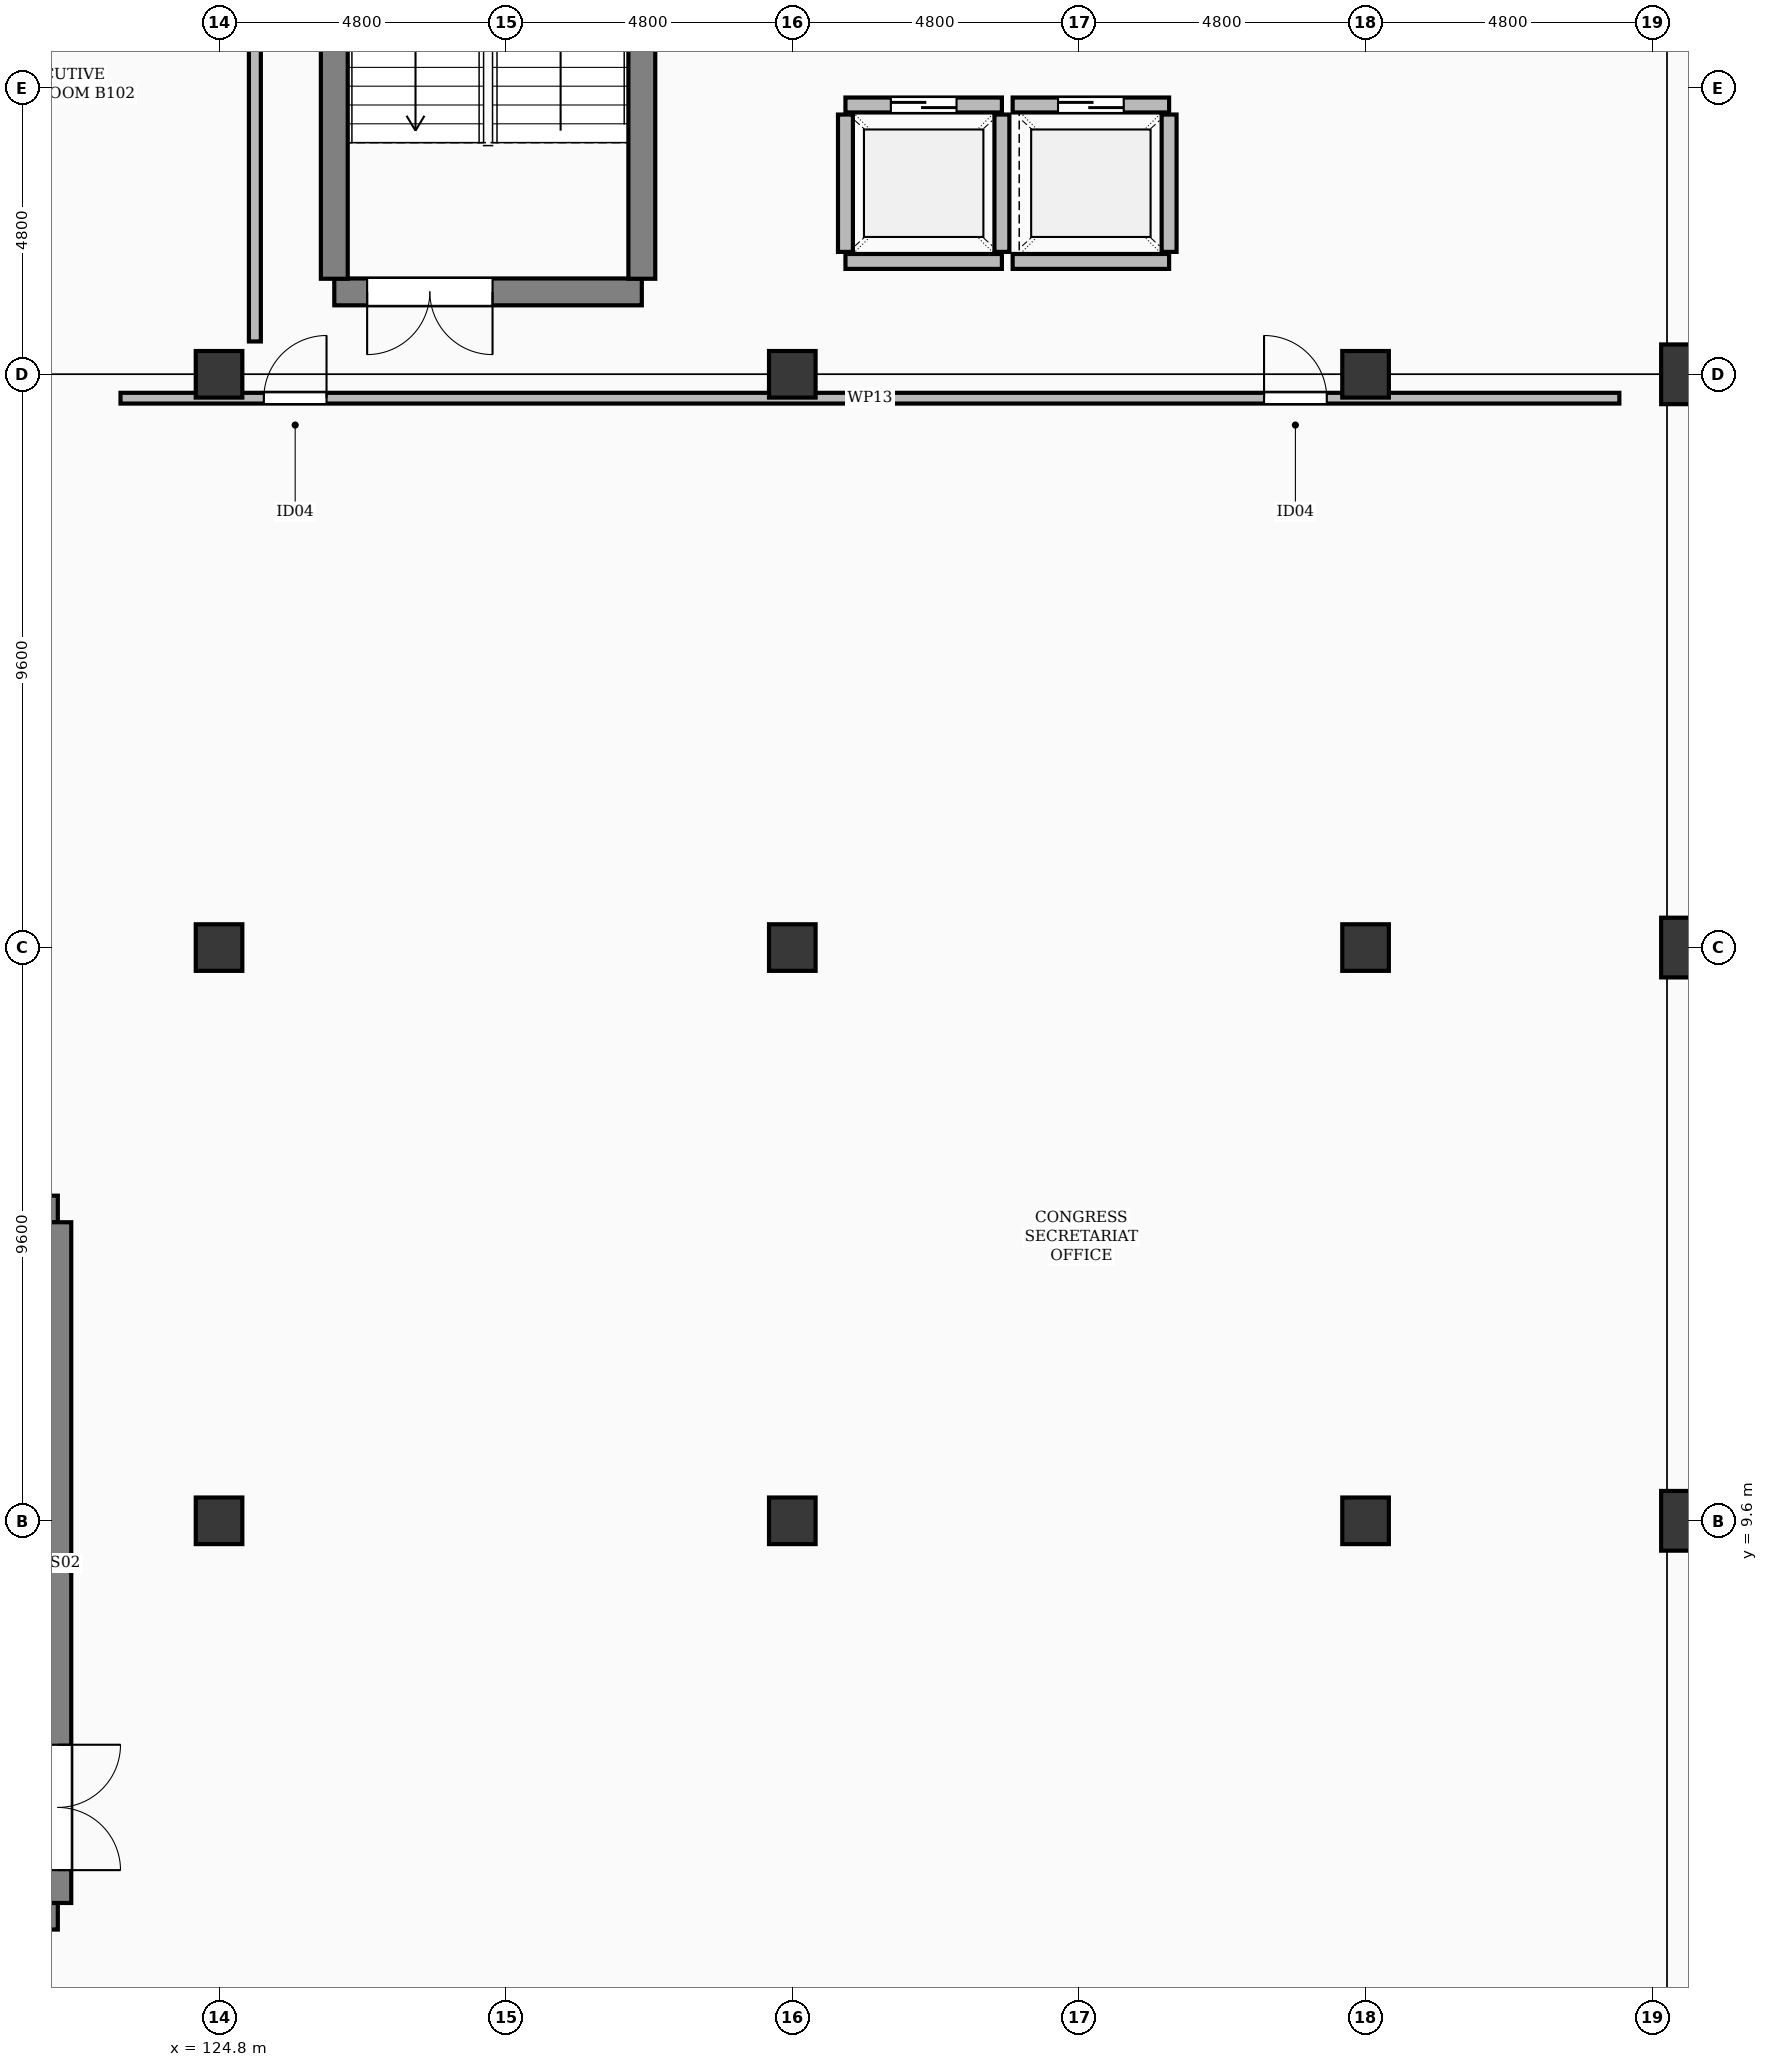
"""IFC4 building model, lengths in metres.
Left out: names, types, materials, properties, quantities, classifications, styles, units other than length and angle.
Written with IfcOpenShell. Run it as: python <this file> out.ifc"""

import sys

from ifc_helpers import new_model, si_unit, direction, frame, frame_2d, origin, origin_2d, place, context, subcontext, project, spatial, rectangle, extrude, element, fill, save


model = new_model("IFC4")
c1 = context("Model", 3, precision=1e-05, world=origin(), true_north=direction((0.0, 1.0)))
c2 = subcontext(c1, "Body", "Model", "MODEL_VIEW")
j1 = project(units=[si_unit("LENGTHUNIT", "METRE"), si_unit("PLANEANGLEUNIT", "RADIAN")], contexts=[c1])
p1 = place(None, origin())
s1 = spatial("IfcSite", under=j1, at=p1, CompositionType="ELEMENT")
p2 = place(p1, origin())
s2 = spatial("IfcBuilding", under=s1, at=p2, CompositionType="ELEMENT")
p3 = place(p2, frame((0.0, 0.0, 6.0)))
s3 = spatial("IfcBuildingStorey", under=s2, at=p3, CompositionType="ELEMENT", Elevation=6.0)
for number, where, z_axis, x_axis in (
    (1, (124.8, 9.6, 0.0), (0.0, 0.0, 1.0), (1.0, 0.0, 0.0)),
    (2, (124.8, 19.2, 0.0), (0.0, 0.0, 1.0), (1.0, 0.0, 0.0)),
    (3, (124.8, 28.8, 0.0), (0.0, 0.0, 1.0), (1.0, 0.0, 0.0)),
    (4, (134.4, 9.6, 0.0), (0.0, 0.0, 1.0), (1.0, 0.0, 0.0)),
    (5, (134.4, 19.2, 0.0), (0.0, 0.0, 1.0), (1.0, 0.0, 0.0)),
    (6, (134.4, 28.8, 0.0), (0.0, 0.0, 1.0), (1.0, 0.0, 0.0)),
    (7, (144.0, 9.6, 0.0), (0.0, 0.0, 1.0), (1.0, 0.0, 0.0)),
    (8, (144.0, 19.2, 0.0), (0.0, 0.0, 1.0), (1.0, 0.0, 0.0)),
    (9, (144.0, 28.8, 0.0), (0.0, 0.0, 1.0), (1.0, 0.0, 0.0)),
):
    element("IfcColumn", number, at=place(p3, frame(where, z_axis=z_axis, x_axis=x_axis)), inside=s3, PredefinedType="COLUMN", context=c2, shape_type="SweptSolid", body=[
        extrude(rectangle(XDim=0.78, YDim=0.78, at=origin_2d()), origin(), (0.0, 0.0, 1.0), 5.4),
    ])
for number, where, z_axis, x_axis in (
    (10, (149.45, 9.6, 0.0), (0.0, 0.0, 1.0), (1.0, 0.0, 0.0)),
    (11, (149.45, 19.2, 0.0), (0.0, 0.0, 1.0), (1.0, 0.0, 0.0)),
    (12, (149.45, 28.8, 0.0), (0.0, 0.0, 1.0), (1.0, 0.0, 0.0)),
):
    element("IfcColumn", number, at=place(p3, frame(where, z_axis=z_axis, x_axis=x_axis)), inside=s3, PredefinedType="COLUMN", context=c2, shape_type="SweptSolid", body=[
        extrude(rectangle(XDim=1.0, YDim=1.0, at=origin_2d()), origin(), (0.0, 0.0, 1.0), 5.4),
    ])
p4 = place(p3, frame((126.73, 30.18, 0.0), z_axis=(0.0, 0.0, 1.0), x_axis=(1.0, 0.0, 0.0)))
e13 = element("IfcWall", 13, at=p4, inside=s3, PredefinedType="SHEAR", context=c2, shape_type="SweptSolid", body=[
    extrude(rectangle(XDim=5.15, YDim=0.45, at=frame_2d((2.575, 0.0))), origin(), (0.0, 0.0, 1.0), 5.1),
])
p5 = place(p4, frame((0.55, 0.0, 0.0)))
e14 = element("IfcOpeningElement", 14, at=p5, cuts=e13, PredefinedType="OPENING", context=c2, shape_type="SweptSolid", body=[
    extrude(rectangle(XDim=2.1, YDim=2.2, at=frame_2d((1.05, 1.1))), frame((0.0, 0.237, 0.0), z_axis=(0.0, -1.0, 0.0), x_axis=(1.0, 0.0, 0.0)), (0.0, 0.0, 1.0), 0.474),
])
for number, where, z_axis, x_axis in (
    (15, (126.73, 30.4, 0.0), (0.0, 0.0, 1.0), (0.0, 1.0, 0.0)),
    (16, (131.88, 30.4, 0.0), (0.0, 0.0, 1.0), (0.0, 1.0, 0.0)),
):
    element("IfcWall", number, at=place(p3, frame(where, z_axis=z_axis, x_axis=x_axis)), inside=s3, PredefinedType="SHEAR", context=c2, shape_type="SweptSolid", body=[
        extrude(rectangle(XDim=11.6, YDim=0.45, at=frame_2d((5.8, 0.0))), origin(), (0.0, 0.0, 1.0), 5.1),
    ])
p6 = place(p3, frame((135.29, 30.69, 0.0), z_axis=(0.0, 0.0, 1.0), x_axis=(1.0, 0.0, 0.0)))
e17 = element("IfcWall", 17, at=p6, inside=s3, PredefinedType="SOLIDWALL", context=c2, shape_type="SweptSolid", body=[
    extrude(rectangle(XDim=2.62, YDim=0.25, at=frame_2d((1.31, 0.0))), origin(), (0.0, 0.0, 1.0), 5.1),
])
p7 = place(p3, frame((135.29, 33.31, 0.0), z_axis=(0.0, 0.0, 1.0), x_axis=(1.0, 0.0, 0.0)))
e18 = element("IfcWall", 18, at=p7, inside=s3, PredefinedType="SOLIDWALL", context=c2, shape_type="SweptSolid", body=[
    extrude(rectangle(XDim=2.62, YDim=0.25, at=frame_2d((1.31, 0.0))), origin(), (0.0, 0.0, 1.0), 5.1),
])
p8 = place(p7, frame((0.76, 0.0, 0.0)))
e19 = element("IfcOpeningElement", 19, at=p8, cuts=e18, PredefinedType="OPENING", context=c2, shape_type="SweptSolid", body=[
    extrude(rectangle(XDim=1.1, YDim=2.2, at=frame_2d((0.55, 1.1))), frame((0.0, 0.137, 0.0), z_axis=(0.0, -1.0, 0.0), x_axis=(1.0, 0.0, 0.0)), (0.0, 0.0, 1.0), 0.274),
])
for number, where, z_axis, x_axis in (
    (20, (135.29, 30.85, 0.0), (0.0, 0.0, 1.0), (0.0, 1.0, 0.0)),
    (21, (137.91, 30.85, 0.0), (0.0, 0.0, 1.0), (0.0, 1.0, 0.0)),
):
    element("IfcWall", number, at=place(p3, frame(where, z_axis=z_axis, x_axis=x_axis)), inside=s3, PredefinedType="SOLIDWALL", context=c2, shape_type="SweptSolid", body=[
        extrude(rectangle(XDim=2.3, YDim=0.25, at=frame_2d((1.15, 0.0))), origin(), (0.0, 0.0, 1.0), 5.1),
    ])
p9 = place(p3, frame((138.09, 30.69, 0.0), z_axis=(0.0, 0.0, 1.0), x_axis=(1.0, 0.0, 0.0)))
e22 = element("IfcWall", 22, at=p9, inside=s3, PredefinedType="SOLIDWALL", context=c2, shape_type="SweptSolid", body=[
    extrude(rectangle(XDim=2.62, YDim=0.25, at=frame_2d((1.31, 0.0))), origin(), (0.0, 0.0, 1.0), 5.1),
])
p10 = place(p3, frame((138.09, 33.31, 0.0), z_axis=(0.0, 0.0, 1.0), x_axis=(1.0, 0.0, 0.0)))
e23 = element("IfcWall", 23, at=p10, inside=s3, PredefinedType="SOLIDWALL", context=c2, shape_type="SweptSolid", body=[
    extrude(rectangle(XDim=2.62, YDim=0.25, at=frame_2d((1.31, 0.0))), origin(), (0.0, 0.0, 1.0), 5.1),
])
p11 = place(p10, frame((0.76, 0.0, 0.0)))
e24 = element("IfcOpeningElement", 24, at=p11, cuts=e23, PredefinedType="OPENING", context=c2, shape_type="SweptSolid", body=[
    extrude(rectangle(XDim=1.1, YDim=2.2, at=frame_2d((0.55, 1.1))), frame((0.0, 0.137, 0.0), z_axis=(0.0, -1.0, 0.0), x_axis=(1.0, 0.0, 0.0)), (0.0, 0.0, 1.0), 0.274),
])
p12 = place(p3, frame((140.71, 30.85, 0.0), z_axis=(0.0, 0.0, 1.0), x_axis=(0.0, 1.0, 0.0)))
e25 = element("IfcWall", 25, at=p12, inside=s3, PredefinedType="SOLIDWALL", context=c2, shape_type="SweptSolid", body=[
    extrude(rectangle(XDim=2.3, YDim=0.25, at=frame_2d((1.15, 0.0))), origin(), (0.0, 0.0, 1.0), 5.1),
])
for number, where, z_axis, x_axis in (
    (26, (116.95, 2.98, 0.0), (0.0, 0.0, 1.0), (1.0, 0.0, 0.0)),
    (27, (116.95, 14.82, 0.0), (0.0, 0.0, 1.0), (1.0, 0.0, 0.0)),
):
    element("IfcWall", number, at=place(p3, frame(where, z_axis=z_axis, x_axis=x_axis)), inside=s3, PredefinedType="SHEAR", context=c2, shape_type="SweptSolid", body=[
        extrude(rectangle(XDim=5.15, YDim=0.45, at=frame_2d((2.575, 0.0))), origin(), (0.0, 0.0, 1.0), 5.1),
    ])
p13 = place(p3, frame((122.1, 3.2, 0.0), z_axis=(0.0, 0.0, 1.0), x_axis=(0.0, 1.0, 0.0)))
e28 = element("IfcWall", 28, at=p13, inside=s3, PredefinedType="SHEAR", context=c2, shape_type="SweptSolid", body=[
    extrude(rectangle(XDim=11.4, YDim=0.45, at=frame_2d((5.7, 0.0))), origin(), (0.0, 0.0, 1.0), 5.1),
])
p14 = place(p13, frame((0.55, 0.0, 0.0)))
e29 = element("IfcOpeningElement", 29, at=p14, cuts=e28, PredefinedType="OPENING", context=c2, shape_type="SweptSolid", body=[
    extrude(rectangle(XDim=2.1, YDim=2.2, at=frame_2d((1.05, 1.1))), frame((0.0, 0.237, 0.0), z_axis=(0.0, -1.0, 0.0), x_axis=(1.0, 0.0, 0.0)), (0.0, 0.0, 1.0), 0.474),
])
p15 = place(p3, frame((125.4, 29.35, 0.0), z_axis=(0.0, 0.0, 1.0), x_axis=(0.0, 1.0, 0.0)))
e30 = element("IfcWall", 30, at=p15, inside=s3, PredefinedType="PARTITIONING", context=c2, shape_type="SweptSolid", body=[
    extrude(rectangle(XDim=11.1, YDim=0.2, at=frame_2d((5.55, 0.0))), origin(), (0.0, 0.0, 1.0), 5.1),
])
p16 = place(p3, frame((123.15, 28.4, 0.0), z_axis=(0.0, 0.0, 1.0), x_axis=(1.0, 0.0, 0.0)))
e31 = element("IfcWall", 31, at=p16, inside=s3, PredefinedType="PARTITIONING", context=c2, shape_type="SweptSolid", body=[
    extrude(rectangle(XDim=25.1, YDim=0.18, at=frame_2d((12.55, 0.0))), origin(), (0.0, 0.0, 1.0), 4.312),
])
p17 = place(p16, frame((2.4, 0.0, 0.0)))
e32 = element("IfcOpeningElement", 32, at=p17, cuts=e31, PredefinedType="OPENING", context=c2, shape_type="SweptSolid", body=[
    extrude(rectangle(XDim=1.05, YDim=2.18, at=frame_2d((0.525, 1.09))), frame((0.0, 0.102, 0.0), z_axis=(0.0, -1.0, 0.0), x_axis=(1.0, 0.0, 0.0)), (0.0, 0.0, 1.0), 0.204),
])
p18 = place(p16, frame((19.15, 0.0, 0.0)))
e33 = element("IfcOpeningElement", 33, at=p18, cuts=e31, PredefinedType="OPENING", context=c2, shape_type="SweptSolid", body=[
    extrude(rectangle(XDim=1.05, YDim=2.18, at=frame_2d((0.525, 1.09))), frame((0.0, 0.102, 0.0), z_axis=(0.0, -1.0, 0.0), x_axis=(1.0, 0.0, 0.0)), (0.0, 0.0, 1.0), 0.204),
])
p19 = place(p5, frame((2.1, 0.0, 0.0), z_axis=(0.0, 0.0, 1.0), x_axis=(-1.0, 0.0, 0.0)))
e34 = element("IfcDoor", 34, at=p19, inside=s3, OperationType="DOUBLE_DOOR_SINGLE_SWING", PredefinedType="DOOR", context=c2, shape_type="SweptSolid", body=[
    extrude(rectangle(XDim=2.1, YDim=2.2, at=frame_2d((1.05, 1.1))), frame((0.0, 0.025, 0.0), z_axis=(0.0, -1.0, 0.0), x_axis=(1.0, 0.0, 0.0)), (0.0, 0.0, 1.0), 0.05),
])
fill(e14, e34)
p20 = place(p8, origin())
e35 = element("IfcDoor", 35, at=p20, inside=s3, OperationType="SLIDING_TO_LEFT", PredefinedType="DOOR", context=c2, shape_type="SweptSolid", body=[
    extrude(rectangle(XDim=1.1, YDim=2.2, at=frame_2d((0.55, 1.1))), frame((0.0, 0.025, 0.0), z_axis=(0.0, -1.0, 0.0), x_axis=(1.0, 0.0, 0.0)), (0.0, 0.0, 1.0), 0.05),
])
fill(e19, e35)
p21 = place(p11, origin())
e36 = element("IfcDoor", 36, at=p21, inside=s3, OperationType="SLIDING_TO_LEFT", PredefinedType="DOOR", context=c2, shape_type="SweptSolid", body=[
    extrude(rectangle(XDim=1.1, YDim=2.2, at=frame_2d((0.55, 1.1))), frame((0.0, 0.025, 0.0), z_axis=(0.0, -1.0, 0.0), x_axis=(1.0, 0.0, 0.0)), (0.0, 0.0, 1.0), 0.05),
])
fill(e24, e36)
p22 = place(p14, frame((2.1, 0.0, 0.0), z_axis=(0.0, 0.0, 1.0), x_axis=(-1.0, 0.0, 0.0)))
e37 = element("IfcDoor", 37, at=p22, inside=s3, OperationType="DOUBLE_DOOR_SINGLE_SWING", PredefinedType="DOOR", context=c2, shape_type="SweptSolid", body=[
    extrude(rectangle(XDim=2.1, YDim=2.2, at=frame_2d((1.05, 1.1))), frame((0.0, 0.025, 0.0), z_axis=(0.0, -1.0, 0.0), x_axis=(1.0, 0.0, 0.0)), (0.0, 0.0, 1.0), 0.05),
])
fill(e29, e37)
p23 = place(p17, origin())
e38 = element("IfcDoor", 38, at=p23, inside=s3, OperationType="SINGLE_SWING_RIGHT", PredefinedType="DOOR", context=c2, shape_type="SweptSolid", body=[
    extrude(rectangle(XDim=1.05, YDim=2.18, at=frame_2d((0.525, 1.09))), frame((0.0, 0.025, 0.0), z_axis=(0.0, -1.0, 0.0), x_axis=(1.0, 0.0, 0.0)), (0.0, 0.0, 1.0), 0.05),
])
fill(e32, e38)
p24 = place(p18, origin())
e39 = element("IfcDoor", 39, at=p24, inside=s3, OperationType="SINGLE_SWING_LEFT", PredefinedType="DOOR", context=c2, shape_type="SweptSolid", body=[
    extrude(rectangle(XDim=1.05, YDim=2.18, at=frame_2d((0.525, 1.09))), frame((0.0, 0.025, 0.0), z_axis=(0.0, -1.0, 0.0), x_axis=(1.0, 0.0, 0.0)), (0.0, 0.0, 1.0), 0.05),
])
fill(e33, e39)
save(model, sys.argv[1])
